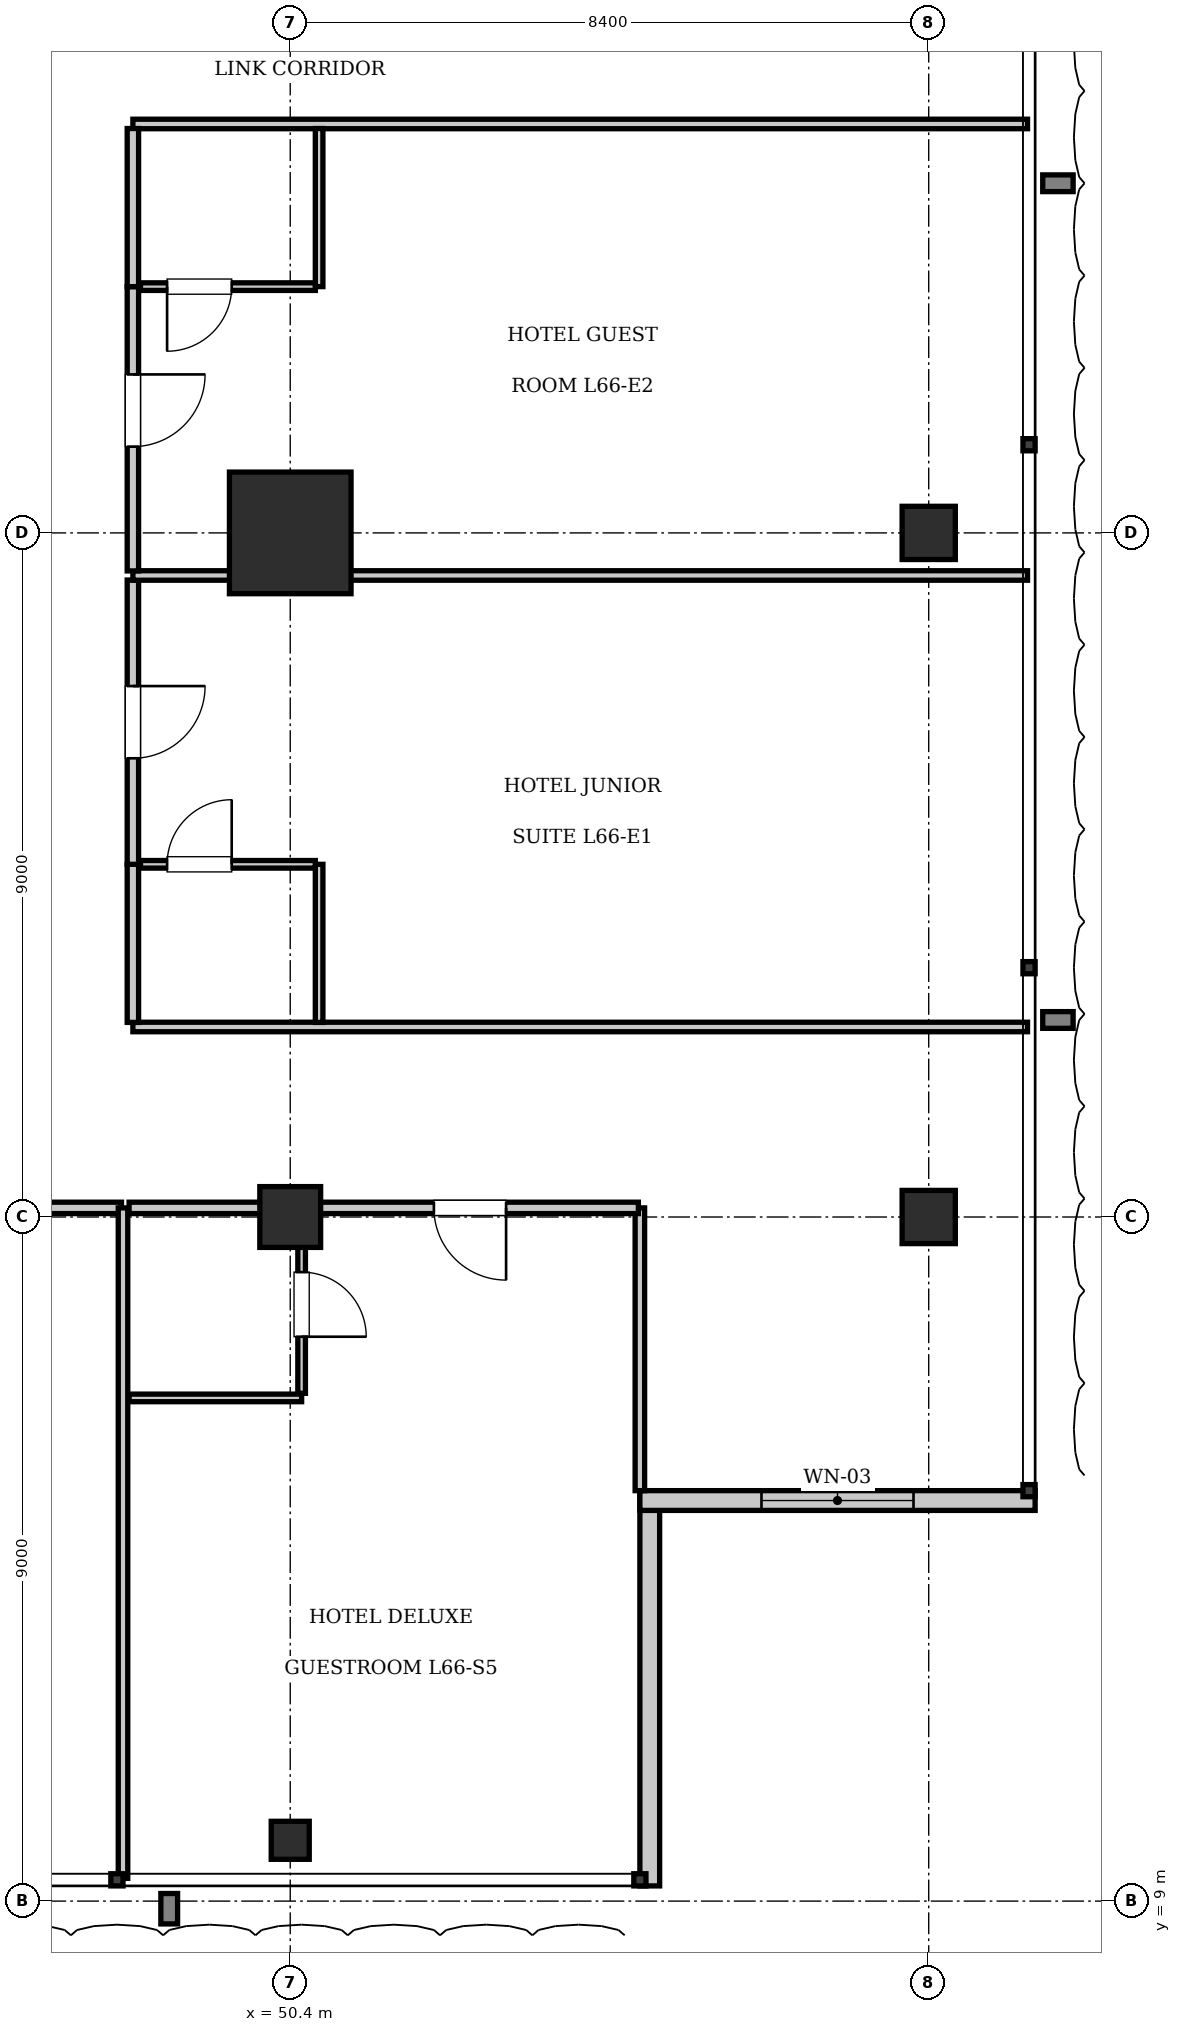
"""IFC4 building model, lengths in metres.
Left out: names, types, materials, properties, quantities, classifications, styles, units other than length and angle.
Written with IfcOpenShell. Run it as: python <this file> out.ifc"""

import sys

from ifc_helpers import new_model, si_unit, direction, frame, frame_2d, origin, origin_2d, place, context, subcontext, project, spatial, rectangle, i_section, extrude, element, fill, save


model = new_model("IFC4")
c1 = context("Model", 3, precision=1e-05, world=origin(), true_north=direction((0.0, 1.0)))
c2 = subcontext(c1, "Body", "Model", "MODEL_VIEW")
j1 = project(units=[si_unit("LENGTHUNIT", "METRE"), si_unit("PLANEANGLEUNIT", "RADIAN")], contexts=[c1])
p1 = place(None, origin())
s1 = spatial("IfcSite", under=j1, at=p1, CompositionType="ELEMENT")
p2 = place(p1, origin())
s2 = spatial("IfcBuilding", under=s1, at=p2, CompositionType="ELEMENT")
p3 = place(p2, frame((0.0, 0.0, 270.2)))
s3 = spatial("IfcBuildingStorey", under=s2, at=p3, CompositionType="ELEMENT", Elevation=270.2)
p4 = place(p3, frame((50.4, 27.0, 0.0), z_axis=(0.0, 0.0, 1.0), x_axis=(1.0, 0.0, 0.0)))
e1 = element("IfcColumn", 1, at=p4, inside=s3, PredefinedType="COLUMN", context=c2, shape_type="SweptSolid", body=[
    extrude(rectangle(XDim=1.6, YDim=1.6, at=origin_2d()), origin(), (0.0, 0.0, 1.0), 3.85),
])
p5 = place(p3, frame((50.4, 18.0, 0.0), z_axis=(0.0, 0.0, 1.0), x_axis=(1.0, 0.0, 0.0)))
e2 = element("IfcColumn", 2, at=p5, inside=s3, PredefinedType="COLUMN", context=c2, shape_type="SweptSolid", body=[
    extrude(rectangle(XDim=0.8, YDim=0.8, at=origin_2d()), origin(), (0.0, 0.0, 1.0), 3.85),
])
for number, where, z_axis, x_axis in (
    (3, (58.8, 18.0, 0.0), (0.0, 0.0, 1.0), (1.0, 0.0, 0.0)),
    (4, (58.8, 27.0, 0.0), (0.0, 0.0, 1.0), (1.0, 0.0, 0.0)),
):
    element("IfcColumn", number, at=place(p3, frame(where, z_axis=z_axis, x_axis=x_axis)), inside=s3, PredefinedType="COLUMN", context=c2, shape_type="SweptSolid", body=[
        extrude(rectangle(XDim=0.7, YDim=0.7, at=origin_2d()), origin(), (0.0, 0.0, 1.0), 3.85),
    ])
p6 = place(p3, frame((50.4, 9.8, 0.0), z_axis=(0.0, 0.0, 1.0), x_axis=(1.0, 0.0, 0.0)))
e5 = element("IfcColumn", 5, at=p6, inside=s3, PredefinedType="COLUMN", context=c2, shape_type="SweptSolid", body=[
    extrude(i_section(OverallWidth=0.5, OverallDepth=0.5, WebThickness=0.022, FlangeThickness=0.032, at=origin_2d()), origin(), (0.0, 0.0, 1.0), 3.85),
])
p7 = place(p3, frame((55.13, 14.4, 0.0), z_axis=(0.0, 0.0, 1.0), x_axis=(0.0, -1.0, 0.0)))
e6 = element("IfcWall", 6, at=p7, inside=s3, PredefinedType="SOLIDWALL", context=c2, shape_type="SweptSolid", body=[
    extrude(rectangle(XDim=5.2, YDim=0.26, at=frame_2d((2.6, 0.0))), origin(), (0.0, 0.0, 1.0), 3.61),
])
p8 = place(p3, frame((60.2, 14.27, 0.0), z_axis=(0.0, 0.0, 1.0), x_axis=(-1.0, 0.0, 0.0)))
e7 = element("IfcWall", 7, at=p8, inside=s3, PredefinedType="SOLIDWALL", context=c2, shape_type="SweptSolid", body=[
    extrude(rectangle(XDim=5.2, YDim=0.26, at=frame_2d((2.6, 0.0))), origin(), (0.0, 0.0, 1.0), 3.61),
])
p9 = place(p8, frame((1.6, 0.0, 0.9)))
e8 = element("IfcOpeningElement", 8, at=p9, cuts=e7, PredefinedType="OPENING", context=c2, shape_type="SweptSolid", body=[
    extrude(rectangle(XDim=2.0, YDim=2.2, at=frame_2d((1.0, 1.1))), frame((0.0, 0.14, 0.0), z_axis=(0.0, -1.0, 0.0), x_axis=(1.0, 0.0, 0.0)), (0.0, 0.0, 1.0), 0.28),
])
p10 = place(p3, frame((55.0, 14.4, 0.0), z_axis=(0.0, 0.0, 1.0), x_axis=(0.0, 1.0, 0.0)))
e9 = element("IfcWall", 9, at=p10, inside=s3, PredefinedType="PARTITIONING", context=c2, shape_type="SweptSolid", body=[
    extrude(rectangle(XDim=3.72, YDim=0.125, at=frame_2d((1.86, 0.0))), origin(), (0.0, 0.0, 1.0), 3.61),
])
p11 = place(p3, frame((43.65, 18.12, 0.0), z_axis=(0.0, 0.0, 1.0), x_axis=(1.0, 0.0, 0.0)))
e10 = element("IfcWall", 10, at=p11, inside=s3, PredefinedType="PARTITIONING", context=c2, shape_type="SweptSolid", body=[
    extrude(rectangle(XDim=4.53, YDim=0.15, at=frame_2d((2.265, 0.0))), origin(), (0.0, 0.0, 1.0), 3.077),
])
p12 = place(p11, frame((1.79, 0.0, 0.0)))
e11 = element("IfcOpeningElement", 11, at=p12, cuts=e10, PredefinedType="OPENING", context=c2, shape_type="SweptSolid", body=[
    extrude(rectangle(XDim=0.95, YDim=2.15, at=frame_2d((0.475, 1.075))), frame((0.0, 0.085, 0.0), z_axis=(0.0, -1.0, 0.0), x_axis=(1.0, 0.0, 0.0)), (0.0, 0.0, 1.0), 0.17),
])
p13 = place(p3, frame((48.2, 9.3, 0.0), z_axis=(0.0, 0.0, 1.0), x_axis=(0.0, 1.0, 0.0)))
e12 = element("IfcWall", 12, at=p13, inside=s3, PredefinedType="PARTITIONING", context=c2, shape_type="SweptSolid", body=[
    extrude(rectangle(XDim=8.82, YDim=0.125, at=frame_2d((4.41, 0.0))), origin(), (0.0, 0.0, 1.0), 3.61),
])
p14 = place(p3, frame((48.28, 18.12, 0.0), z_axis=(0.0, 0.0, 1.0), x_axis=(1.0, 0.0, 0.0)))
e13 = element("IfcWall", 13, at=p14, inside=s3, PredefinedType="PARTITIONING", context=c2, shape_type="SweptSolid", body=[
    extrude(rectangle(XDim=2.27, YDim=0.15, at=frame_2d((1.135, 0.0))), origin(), (0.0, 0.0, 1.0), 3.077),
])
p15 = place(p3, frame((48.28, 15.62, 0.0), z_axis=(0.0, 0.0, 1.0), x_axis=(1.0, 0.0, 0.0)))
e14 = element("IfcWall", 14, at=p15, inside=s3, PredefinedType="PARTITIONING", context=c2, shape_type="SweptSolid", body=[
    extrude(rectangle(XDim=2.27, YDim=0.1, at=frame_2d((1.135, 0.0))), origin(), (0.0, 0.0, 1.0), 3.61),
])
p16 = place(p3, frame((50.55, 15.68, 0.0), z_axis=(0.0, 0.0, 1.0), x_axis=(0.0, 1.0, 0.0)))
e15 = element("IfcWall", 15, at=p16, inside=s3, PredefinedType="PARTITIONING", context=c2, shape_type="SweptSolid", body=[
    extrude(rectangle(XDim=2.34, YDim=0.1, at=frame_2d((1.17, 0.0))), origin(), (0.0, 0.0, 1.0), 3.61),
])
p17 = place(p16, frame((0.745, 0.0, 0.0)))
e16 = element("IfcOpeningElement", 16, at=p17, cuts=e15, PredefinedType="OPENING", context=c2, shape_type="SweptSolid", body=[
    extrude(rectangle(XDim=0.85, YDim=2.1, at=frame_2d((0.425, 1.05))), frame((0.0, 0.06, 0.0), z_axis=(0.0, -1.0, 0.0), x_axis=(1.0, 0.0, 0.0)), (0.0, 0.0, 1.0), 0.12),
])
p18 = place(p3, frame((50.55, 18.12, 0.0), z_axis=(0.0, 0.0, 1.0), x_axis=(1.0, 0.0, 0.0)))
e17 = element("IfcWall", 17, at=p18, inside=s3, PredefinedType="PARTITIONING", context=c2, shape_type="SweptSolid", body=[
    extrude(rectangle(XDim=4.43, YDim=0.15, at=frame_2d((2.215, 0.0))), origin(), (0.0, 0.0, 1.0), 3.077),
])
p19 = place(p18, frame((1.74, 0.0, 0.0)))
e18 = element("IfcOpeningElement", 18, at=p19, cuts=e17, PredefinedType="OPENING", context=c2, shape_type="SweptSolid", body=[
    extrude(rectangle(XDim=0.95, YDim=2.15, at=frame_2d((0.475, 1.075))), frame((0.0, 0.085, 0.0), z_axis=(0.0, -1.0, 0.0), x_axis=(1.0, 0.0, 0.0)), (0.0, 0.0, 1.0), 0.17),
])
for number, where, z_axis, x_axis in (
    (19, (48.33, 20.5, 0.0), (0.0, 0.0, 1.0), (1.0, 0.0, 0.0)),
    (20, (48.33, 32.38, 0.0), (0.0, 0.0, 1.0), (1.0, 0.0, 0.0)),
):
    element("IfcWall", number, at=place(p3, frame(where, z_axis=z_axis, x_axis=x_axis)), inside=s3, PredefinedType="PARTITIONING", context=c2, shape_type="SweptSolid", body=[
        extrude(rectangle(XDim=11.77, YDim=0.125, at=frame_2d((5.885, 0.0))), origin(), (0.0, 0.0, 1.0), 3.61),
    ])
p20 = place(p3, frame((48.33, 20.56, 0.0), z_axis=(0.0, 0.0, 1.0), x_axis=(0.0, 1.0, 0.0)))
e21 = element("IfcWall", 21, at=p20, inside=s3, PredefinedType="PARTITIONING", context=c2, shape_type="SweptSolid", body=[
    extrude(rectangle(XDim=2.08, YDim=0.15, at=frame_2d((1.04, 0.0))), origin(), (0.0, 0.0, 1.0), 3.61),
])
p21 = place(p3, frame((48.33, 22.64, 0.0), z_axis=(0.0, 0.0, 1.0), x_axis=(0.0, 1.0, 0.0)))
e22 = element("IfcWall", 22, at=p21, inside=s3, PredefinedType="PARTITIONING", context=c2, shape_type="SweptSolid", body=[
    extrude(rectangle(XDim=3.74, YDim=0.15, at=frame_2d((1.87, 0.0))), origin(), (0.0, 0.0, 1.0), 3.61),
])
p22 = place(p21, frame((1.395, 0.0, 0.0)))
e23 = element("IfcOpeningElement", 23, at=p22, cuts=e22, PredefinedType="OPENING", context=c2, shape_type="SweptSolid", body=[
    extrude(rectangle(XDim=0.95, YDim=2.15, at=frame_2d((0.475, 1.075))), frame((0.0, 0.085, 0.0), z_axis=(0.0, -1.0, 0.0), x_axis=(1.0, 0.0, 0.0)), (0.0, 0.0, 1.0), 0.17),
])
p23 = place(p3, frame((50.78, 20.56, 0.0), z_axis=(0.0, 0.0, 1.0), x_axis=(0.0, 1.0, 0.0)))
e24 = element("IfcWall", 24, at=p23, inside=s3, PredefinedType="PARTITIONING", context=c2, shape_type="SweptSolid", body=[
    extrude(rectangle(XDim=2.08, YDim=0.1, at=frame_2d((1.04, 0.0))), origin(), (0.0, 0.0, 1.0), 3.61),
])
p24 = place(p3, frame((48.43, 22.64, 0.0), z_axis=(0.0, 0.0, 1.0), x_axis=(1.0, 0.0, 0.0)))
e25 = element("IfcWall", 25, at=p24, inside=s3, PredefinedType="PARTITIONING", context=c2, shape_type="SweptSolid", body=[
    extrude(rectangle(XDim=2.3, YDim=0.1, at=frame_2d((1.15, 0.0))), origin(), (0.0, 0.0, 1.0), 3.61),
])
p25 = place(p24, frame((0.35, 0.0, 0.0)))
e26 = element("IfcOpeningElement", 26, at=p25, cuts=e25, PredefinedType="OPENING", context=c2, shape_type="SweptSolid", body=[
    extrude(rectangle(XDim=0.85, YDim=2.1, at=frame_2d((0.425, 1.05))), frame((0.0, 0.06, 0.0), z_axis=(0.0, -1.0, 0.0), x_axis=(1.0, 0.0, 0.0)), (0.0, 0.0, 1.0), 0.12),
])
p26 = place(p3, frame((48.33, 26.44, 0.0), z_axis=(0.0, 0.0, 1.0), x_axis=(1.0, 0.0, 0.0)))
e27 = element("IfcWall", 27, at=p26, inside=s3, PredefinedType="PARTITIONING", context=c2, shape_type="SweptSolid", body=[
    extrude(rectangle(XDim=11.77, YDim=0.125, at=frame_2d((5.885, 0.0))), origin(), (0.0, 0.0, 1.0), 3.61),
])
p27 = place(p3, frame((48.33, 26.5, 0.0), z_axis=(0.0, 0.0, 1.0), x_axis=(0.0, 1.0, 0.0)))
e28 = element("IfcWall", 28, at=p27, inside=s3, PredefinedType="PARTITIONING", context=c2, shape_type="SweptSolid", body=[
    extrude(rectangle(XDim=3.74, YDim=0.15, at=frame_2d((1.87, 0.0))), origin(), (0.0, 0.0, 1.0), 3.61),
])
p28 = place(p27, frame((1.635, 0.0, 0.0)))
e29 = element("IfcOpeningElement", 29, at=p28, cuts=e28, PredefinedType="OPENING", context=c2, shape_type="SweptSolid", body=[
    extrude(rectangle(XDim=0.95, YDim=2.15, at=frame_2d((0.475, 1.075))), frame((0.0, 0.085, 0.0), z_axis=(0.0, -1.0, 0.0), x_axis=(1.0, 0.0, 0.0)), (0.0, 0.0, 1.0), 0.17),
])
p29 = place(p3, frame((48.33, 30.24, 0.0), z_axis=(0.0, 0.0, 1.0), x_axis=(0.0, 1.0, 0.0)))
e30 = element("IfcWall", 30, at=p29, inside=s3, PredefinedType="PARTITIONING", context=c2, shape_type="SweptSolid", body=[
    extrude(rectangle(XDim=2.08, YDim=0.15, at=frame_2d((1.04, 0.0))), origin(), (0.0, 0.0, 1.0), 3.61),
])
p30 = place(p3, frame((50.78, 30.24, 0.0), z_axis=(0.0, 0.0, 1.0), x_axis=(0.0, 1.0, 0.0)))
e31 = element("IfcWall", 31, at=p30, inside=s3, PredefinedType="PARTITIONING", context=c2, shape_type="SweptSolid", body=[
    extrude(rectangle(XDim=2.08, YDim=0.1, at=frame_2d((1.04, 0.0))), origin(), (0.0, 0.0, 1.0), 3.61),
])
p31 = place(p3, frame((48.43, 30.24, 0.0), z_axis=(0.0, 0.0, 1.0), x_axis=(1.0, 0.0, 0.0)))
e32 = element("IfcWall", 32, at=p31, inside=s3, PredefinedType="PARTITIONING", context=c2, shape_type="SweptSolid", body=[
    extrude(rectangle(XDim=2.3, YDim=0.1, at=frame_2d((1.15, 0.0))), origin(), (0.0, 0.0, 1.0), 3.61),
])
p32 = place(p31, frame((0.35, 0.0, 0.0)))
e33 = element("IfcOpeningElement", 33, at=p32, cuts=e32, PredefinedType="OPENING", context=c2, shape_type="SweptSolid", body=[
    extrude(rectangle(XDim=0.85, YDim=2.1, at=frame_2d((0.425, 1.05))), frame((0.0, 0.06, 0.0), z_axis=(0.0, -1.0, 0.0), x_axis=(1.0, 0.0, 0.0)), (0.0, 0.0, 1.0), 0.12),
])
p33 = place(p9, origin())
e34 = element("IfcWindow", 34, at=p33, inside=s3, PartitioningType="SINGLE_PANEL", PredefinedType="WINDOW", context=c2, shape_type="SweptSolid", body=[
    extrude(rectangle(XDim=2.0, YDim=2.2, at=frame_2d((1.0, 1.1))), frame((0.0, 0.03, 0.0), z_axis=(0.0, -1.0, 0.0), x_axis=(1.0, 0.0, 0.0)), (0.0, 0.0, 1.0), 0.06),
])
fill(e8, e34)
p34 = place(p17, frame((0.85, 0.0, 0.0), z_axis=(0.0, 0.0, 1.0), x_axis=(-1.0, 0.0, 0.0)))
e35 = element("IfcDoor", 35, at=p34, inside=s3, OperationType="SINGLE_SWING_RIGHT", PredefinedType="DOOR", context=c2, shape_type="SweptSolid", body=[
    extrude(rectangle(XDim=0.85, YDim=2.1, at=frame_2d((0.425, 1.05))), frame((0.0, 0.025, 0.0), z_axis=(0.0, -1.0, 0.0), x_axis=(1.0, 0.0, 0.0)), (0.0, 0.0, 1.0), 0.05),
])
fill(e16, e35)
p35 = place(p19, frame((0.95, 0.0, 0.0), z_axis=(0.0, 0.0, 1.0), x_axis=(-1.0, 0.0, 0.0)))
e36 = element("IfcDoor", 36, at=p35, inside=s3, OperationType="SINGLE_SWING_LEFT", PredefinedType="DOOR", context=c2, shape_type="SweptSolid", body=[
    extrude(rectangle(XDim=0.95, YDim=2.15, at=frame_2d((0.475, 1.075))), frame((0.0, 0.025, 0.0), z_axis=(0.0, -1.0, 0.0), x_axis=(1.0, 0.0, 0.0)), (0.0, 0.0, 1.0), 0.05),
])
fill(e18, e36)
p36 = place(p25, origin())
e37 = element("IfcDoor", 37, at=p36, inside=s3, OperationType="SINGLE_SWING_RIGHT", PredefinedType="DOOR", context=c2, shape_type="SweptSolid", body=[
    extrude(rectangle(XDim=0.85, YDim=2.1, at=frame_2d((0.425, 1.05))), frame((0.0, 0.025, 0.0), z_axis=(0.0, -1.0, 0.0), x_axis=(1.0, 0.0, 0.0)), (0.0, 0.0, 1.0), 0.05),
])
fill(e26, e37)
p37 = place(p22, frame((0.95, 0.0, 0.0), z_axis=(0.0, 0.0, 1.0), x_axis=(-1.0, 0.0, 0.0)))
e38 = element("IfcDoor", 38, at=p37, inside=s3, OperationType="SINGLE_SWING_LEFT", PredefinedType="DOOR", context=c2, shape_type="SweptSolid", body=[
    extrude(rectangle(XDim=0.95, YDim=2.15, at=frame_2d((0.475, 1.075))), frame((0.0, 0.025, 0.0), z_axis=(0.0, -1.0, 0.0), x_axis=(1.0, 0.0, 0.0)), (0.0, 0.0, 1.0), 0.05),
])
fill(e23, e38)
p38 = place(p32, frame((0.85, 0.0, 0.0), z_axis=(0.0, 0.0, 1.0), x_axis=(-1.0, 0.0, 0.0)))
e39 = element("IfcDoor", 39, at=p38, inside=s3, OperationType="SINGLE_SWING_RIGHT", PredefinedType="DOOR", context=c2, shape_type="SweptSolid", body=[
    extrude(rectangle(XDim=0.85, YDim=2.1, at=frame_2d((0.425, 1.05))), frame((0.0, 0.025, 0.0), z_axis=(0.0, -1.0, 0.0), x_axis=(1.0, 0.0, 0.0)), (0.0, 0.0, 1.0), 0.05),
])
fill(e33, e39)
p39 = place(p28, frame((0.95, 0.0, 0.0), z_axis=(0.0, 0.0, 1.0), x_axis=(-1.0, 0.0, 0.0)))
e40 = element("IfcDoor", 40, at=p39, inside=s3, OperationType="SINGLE_SWING_LEFT", PredefinedType="DOOR", context=c2, shape_type="SweptSolid", body=[
    extrude(rectangle(XDim=0.95, YDim=2.15, at=frame_2d((0.475, 1.075))), frame((0.0, 0.025, 0.0), z_axis=(0.0, -1.0, 0.0), x_axis=(1.0, 0.0, 0.0)), (0.0, 0.0, 1.0), 0.05),
])
fill(e29, e40)
save(model, sys.argv[1])
